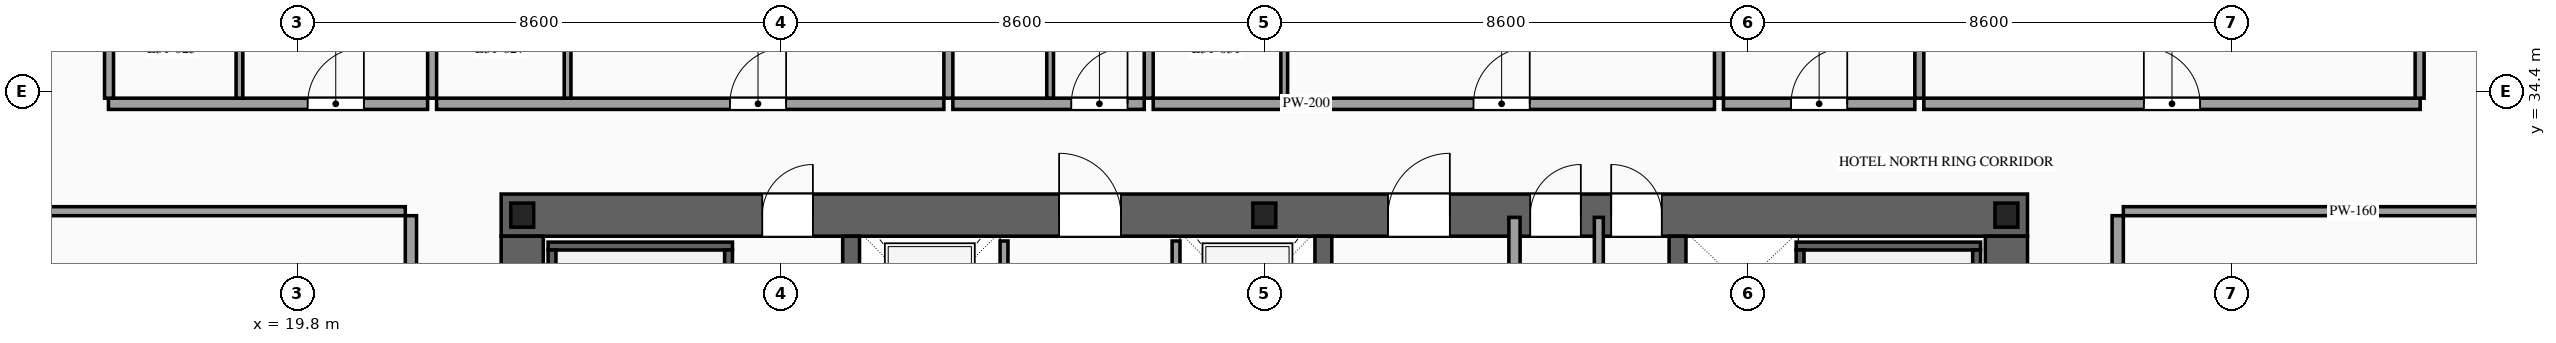
"""IFC4 building model, lengths in metres.
Left out: names, types, materials, properties, quantities, classifications, styles, units other than length and angle.
Written with IfcOpenShell. Run it as: python <this file> out.ifc"""

import sys

from ifc_helpers import new_model, si_unit, direction, frame, frame_2d, origin, origin_2d, place, context, subcontext, project, spatial, rectangle, i_section, extrude, source, transform, mapped, element, fill, save


model = new_model("IFC4")
c1 = context("Model", 3, precision=1e-05, world=origin(), true_north=direction((0.0, 1.0)))
c2 = subcontext(c1, "Body", "Model", "MODEL_VIEW")
j1 = project(units=[si_unit("LENGTHUNIT", "METRE"), si_unit("PLANEANGLEUNIT", "RADIAN")], contexts=[c1])
p1 = place(None, origin())
s1 = spatial("IfcSite", under=j1, at=p1, CompositionType="ELEMENT")
p2 = place(p1, origin())
s2 = spatial("IfcBuilding", under=s1, at=p2, CompositionType="ELEMENT")
p3 = place(p2, frame((0.0, 0.0, 119.0)))
s3 = spatial("IfcBuildingStorey", under=s2, at=p3, CompositionType="ELEMENT", Elevation=119.0)
p4 = place(p3, frame((23.425, 32.2, 0.0), z_axis=(0.0, 0.0, 1.0), x_axis=(1.0, 0.0, 0.0)))
e1 = element("IfcWall", 1, at=p4, inside=s3, PredefinedType="SHEAR", context=c2, shape_type="SweptSolid", body=[
    extrude(rectangle(XDim=27.15, YDim=0.75, at=frame_2d((13.575, 0.0))), origin(), (0.0, 0.0, 1.0), 3.6),
])
p5 = place(p4, frame((4.645, 0.0, 0.0)))
e2 = element("IfcOpeningElement", 2, at=p5, cuts=e1, PredefinedType="OPENING", context=c2, shape_type="SweptSolid", body=[
    extrude(rectangle(XDim=0.9, YDim=2.15, at=frame_2d((0.45, 1.075))), frame((0.0, 0.39, 0.0), z_axis=(0.0, -1.0, 0.0), x_axis=(1.0, 0.0, 0.0)), (0.0, 0.0, 1.0), 0.78),
])
p6 = place(p4, frame((9.925, 0.0, 0.0)))
e3 = element("IfcOpeningElement", 3, at=p6, cuts=e1, PredefinedType="OPENING", context=c2, shape_type="SweptSolid", body=[
    extrude(rectangle(XDim=1.1, YDim=2.2, at=frame_2d((0.55, 1.1))), frame((0.0, 0.39, 0.0), z_axis=(0.0, -1.0, 0.0), x_axis=(1.0, 0.0, 0.0)), (0.0, 0.0, 1.0), 0.78),
])
p7 = place(p4, frame((15.775, 0.0, 0.0)))
e4 = element("IfcOpeningElement", 4, at=p7, cuts=e1, PredefinedType="OPENING", context=c2, shape_type="SweptSolid", body=[
    extrude(rectangle(XDim=1.1, YDim=2.2, at=frame_2d((0.55, 1.1))), frame((0.0, 0.39, 0.0), z_axis=(0.0, -1.0, 0.0), x_axis=(1.0, 0.0, 0.0)), (0.0, 0.0, 1.0), 0.78),
])
p8 = place(p4, frame((18.305, 0.0, 0.0)))
e5 = element("IfcOpeningElement", 5, at=p8, cuts=e1, PredefinedType="OPENING", context=c2, shape_type="SweptSolid", body=[
    extrude(rectangle(XDim=0.9, YDim=2.15, at=frame_2d((0.45, 1.075))), frame((0.0, 0.39, 0.0), z_axis=(0.0, -1.0, 0.0), x_axis=(1.0, 0.0, 0.0)), (0.0, 0.0, 1.0), 0.78),
])
p9 = place(p4, frame((19.745, 0.0, 0.0)))
e6 = element("IfcOpeningElement", 6, at=p9, cuts=e1, PredefinedType="OPENING", context=c2, shape_type="SweptSolid", body=[
    extrude(rectangle(XDim=0.9, YDim=2.15, at=frame_2d((0.45, 1.075))), frame((0.0, 0.39, 0.0), z_axis=(0.0, -1.0, 0.0), x_axis=(1.0, 0.0, 0.0)), (0.0, 0.0, 1.0), 0.78),
])
m1 = source(origin(), c2, "Body", "SweptSolid", [
    extrude(rectangle(XDim=12.05, YDim=0.75, at=frame_2d((6.025, 0.0))), origin(), (0.0, 0.0, 1.0), 3.6),
])
for number, where, z_axis, x_axis in (
    (7, (23.8, 19.775, 0.0), (0.0, 0.0, 1.0), (0.0, 1.0, 0.0)),
    (8, (50.2, 19.775, 0.0), (0.0, 0.0, 1.0), (0.0, 1.0, 0.0)),
):
    element("IfcWall", number, at=place(p3, frame(where, z_axis=z_axis, x_axis=x_axis)), inside=s3, PredefinedType="SHEAR", context=c2, shape_type="MappedRepresentation", body=[
        mapped(m1, transform((0.0, 0.0, 0.0), scale=1.0)),
    ])
m2 = source(origin(), c2, "Body", "SweptSolid", [
    extrude(rectangle(XDim=12.05, YDim=0.3, at=frame_2d((6.025, 0.0))), origin(), (0.0, 0.0, 1.0), 3.6),
])
for number, where, z_axis, x_axis in (
    (9, (29.65, 19.775, 0.0), (0.0, 0.0, 1.0), (0.0, 1.0, 0.0)),
    (10, (38.05, 19.775, 0.0), (0.0, 0.0, 1.0), (0.0, 1.0, 0.0)),
    (11, (44.35, 19.775, 0.0), (0.0, 0.0, 1.0), (0.0, 1.0, 0.0)),
):
    element("IfcWall", number, at=place(p3, frame(where, z_axis=z_axis, x_axis=x_axis)), inside=s3, PredefinedType="SOLIDWALL", context=c2, shape_type="MappedRepresentation", body=[
        mapped(m2, transform((0.0, 0.0, 0.0), scale=1.0)),
    ])
m3 = source(origin(), c2, "Body", "SweptSolid", [
    extrude(i_section(OverallWidth=0.407, OverallDepth=0.428, WebThickness=0.02, FlangeThickness=0.035, at=origin_2d()), origin(), (0.0, 0.0, 1.0), 3.6),
])
for number, where, z_axis, x_axis in (
    (12, (23.8, 32.2, 0.0), (0.0, 0.0, 1.0), (1.0, 0.0, 0.0)),
    (13, (37.0, 32.2, 0.0), (0.0, 0.0, 1.0), (1.0, 0.0, 0.0)),
    (14, (50.2, 32.2, 0.0), (0.0, 0.0, 1.0), (1.0, 0.0, 0.0)),
):
    element("IfcColumn", number, at=place(p3, frame(where, z_axis=z_axis, x_axis=x_axis)), inside=s3, PredefinedType="COLUMN", context=c2, shape_type="MappedRepresentation", body=[
        mapped(m3, transform((0.0, 0.0, 0.0), scale=1.0)),
    ])
p10 = place(p3, frame((32.37, 29.4, 0.0), z_axis=(0.0, 0.0, 1.0), x_axis=(0.0, 1.0, 0.0)))
e15 = element("IfcWall", 15, at=p10, inside=s3, PredefinedType="SOLIDWALL", context=c2, shape_type="SweptSolid", body=[
    extrude(rectangle(XDim=2.34, YDim=0.14, at=frame_2d((1.17, 0.0))), origin(), (0.0, 0.0, 1.0), 3.38),
])
p11 = place(p10, frame((0.62, 0.0, 0.0)))
e16 = element("IfcOpeningElement", 16, at=p11, cuts=e15, PredefinedType="OPENING", context=c2, shape_type="SweptSolid", body=[
    extrude(rectangle(XDim=1.1, YDim=2.2, at=frame_2d((0.55, 1.1))), frame((0.0, 0.085, 0.0), z_axis=(0.0, -1.0, 0.0), x_axis=(1.0, 0.0, 0.0)), (0.0, 0.0, 1.0), 0.17),
])
p12 = place(p3, frame((35.43, 29.4, 0.0), z_axis=(0.0, 0.0, 1.0), x_axis=(0.0, 1.0, 0.0)))
e17 = element("IfcWall", 17, at=p12, inside=s3, PredefinedType="SOLIDWALL", context=c2, shape_type="SweptSolid", body=[
    extrude(rectangle(XDim=2.34, YDim=0.14, at=frame_2d((1.17, 0.0))), origin(), (0.0, 0.0, 1.0), 3.38),
])
p13 = place(p12, frame((0.62, 0.0, 0.0)))
e18 = element("IfcOpeningElement", 18, at=p13, cuts=e17, PredefinedType="OPENING", context=c2, shape_type="SweptSolid", body=[
    extrude(rectangle(XDim=1.1, YDim=2.2, at=frame_2d((0.55, 1.1))), frame((0.0, 0.085, 0.0), z_axis=(0.0, -1.0, 0.0), x_axis=(1.0, 0.0, 0.0)), (0.0, 0.0, 1.0), 0.17),
])
m4 = source(origin(), c2, "Body", "SweptSolid", [
    extrude(rectangle(XDim=3.28, YDim=0.14, at=frame_2d((1.64, 0.0))), origin(), (0.0, 0.0, 1.0), 3.38),
])
p14 = place(p3, frame((24.26, 31.65, 0.0), z_axis=(0.0, 0.0, 1.0), x_axis=(1.0, 0.0, 0.0)))
e19 = element("IfcWall", 19, at=p14, inside=s3, PredefinedType="SOLIDWALL", context=c2, shape_type="MappedRepresentation", body=[
    mapped(m4, transform((0.0, 0.0, 0.0), scale=1.0)),
])
m5 = source(origin(), c2, "Body", "SweptSolid", [
    extrude(rectangle(XDim=8.94, YDim=0.14, at=frame_2d((4.47, 0.0))), origin(), (0.0, 0.0, 1.0), 3.38),
])
for number, where, z_axis, x_axis in (
    (20, (24.33, 22.64, 0.0), (0.0, 0.0, 1.0), (0.0, 1.0, 0.0)),
    (21, (27.47, 22.64, 0.0), (0.0, 0.0, 1.0), (0.0, 1.0, 0.0)),
):
    element("IfcWall", number, at=place(p3, frame(where, z_axis=z_axis, x_axis=x_axis)), inside=s3, PredefinedType="SOLIDWALL", context=c2, shape_type="MappedRepresentation", body=[
        mapped(m5, transform((0.0, 0.0, 0.0), scale=1.0)),
    ])
p15 = place(p3, frame((46.46, 31.65, 0.0), z_axis=(0.0, 0.0, 1.0), x_axis=(1.0, 0.0, 0.0)))
e22 = element("IfcWall", 22, at=p15, inside=s3, PredefinedType="SOLIDWALL", context=c2, shape_type="MappedRepresentation", body=[
    mapped(m4, transform((0.0, 0.0, 0.0), scale=1.0)),
])
for number, where, z_axis, x_axis in (
    (23, (46.53, 22.64, 0.0), (0.0, 0.0, 1.0), (0.0, 1.0, 0.0)),
    (24, (49.67, 22.64, 0.0), (0.0, 0.0, 1.0), (0.0, 1.0, 0.0)),
):
    element("IfcWall", number, at=place(p3, frame(where, z_axis=z_axis, x_axis=x_axis)), inside=s3, PredefinedType="SOLIDWALL", context=c2, shape_type="MappedRepresentation", body=[
        mapped(m5, transform((0.0, 0.0, 0.0), scale=1.0)),
    ])
m6 = source(origin(), c2, "Body", "SweptSolid", [
    extrude(rectangle(XDim=5.96, YDim=0.2, at=frame_2d((2.98, 0.0))), origin(), (0.0, 0.0, 1.0), 3.38),
])
p16 = place(p3, frame((41.45, 26.2, 0.0), z_axis=(0.0, 0.0, 1.0), x_axis=(0.0, 1.0, 0.0)))
e25 = element("IfcWall", 25, at=p16, inside=s3, PredefinedType="PARTITIONING", context=c2, shape_type="MappedRepresentation", body=[
    mapped(m6, transform((0.0, 0.0, 0.0), scale=1.0)),
])
m7 = source(origin(), c2, "Body", "SweptSolid", [
    extrude(rectangle(XDim=5.96, YDim=0.16, at=frame_2d((2.98, 0.0))), origin(), (0.0, 0.0, 1.0), 3.38),
])
p17 = place(p3, frame((42.95, 26.2, 0.0), z_axis=(0.0, 0.0, 1.0), x_axis=(0.0, 1.0, 0.0)))
e26 = element("IfcWall", 26, at=p17, inside=s3, PredefinedType="PARTITIONING", context=c2, shape_type="MappedRepresentation", body=[
    mapped(m7, transform((0.0, 0.0, 0.0), scale=1.0)),
])
p18 = place(p3, frame((16.44, 34.18, 0.0), z_axis=(0.0, 0.0, 1.0), x_axis=(1.0, 0.0, 0.0)))
e27 = element("IfcWall", 27, at=p18, inside=s3, PredefinedType="PARTITIONING", context=c2, shape_type="SweptSolid", body=[
    extrude(rectangle(XDim=5.677, YDim=0.2, at=frame_2d((2.838, 0.0))), origin(), (0.0, 0.0, 1.0), 3.38),
])
p19 = place(p18, frame((3.543, 0.0, 0.0)))
e28 = element("IfcOpeningElement", 28, at=p19, cuts=e27, PredefinedType="OPENING", context=c2, shape_type="SweptSolid", body=[
    extrude(rectangle(XDim=1.0, YDim=2.2, at=frame_2d((0.5, 1.1))), frame((0.0, 0.115, 0.0), z_axis=(0.0, -1.0, 0.0), x_axis=(1.0, 0.0, 0.0)), (0.0, 0.0, 1.0), 0.23),
])
m8 = source(origin(), c2, "Body", "SweptSolid", [
    extrude(rectangle(XDim=14.97, YDim=0.16, at=frame_2d((7.485, 0.0))), origin(), (0.0, 0.0, 1.0), 3.38),
])
p20 = place(p3, frame((22.197, 34.28, 0.0), z_axis=(0.0, 0.0, 1.0), x_axis=(0.0, 1.0, 0.0)))
e29 = element("IfcWall", 29, at=p20, inside=s3, PredefinedType="PARTITIONING", context=c2, shape_type="MappedRepresentation", body=[
    mapped(m8, transform((0.0, 0.0, 0.0), scale=1.0)),
])
m9 = source(origin(), c2, "Body", "SweptSolid", [
    extrude(rectangle(XDim=2.42, YDim=0.12, at=frame_2d((1.21, 0.0))), origin(), (0.0, 0.0, 1.0), 3.38),
])
p21 = place(p3, frame((18.77, 34.28, 0.0), z_axis=(0.0, 0.0, 1.0), x_axis=(0.0, 1.0, 0.0)))
e30 = element("IfcWall", 30, at=p21, inside=s3, PredefinedType="PARTITIONING", context=c2, shape_type="MappedRepresentation", body=[
    mapped(m9, transform((0.0, 0.0, 0.0), scale=1.0)),
])
p22 = place(p3, frame((22.277, 34.18, 0.0), z_axis=(0.0, 0.0, 1.0), x_axis=(1.0, 0.0, 0.0)))
e31 = element("IfcWall", 31, at=p22, inside=s3, PredefinedType="PARTITIONING", context=c2, shape_type="SweptSolid", body=[
    extrude(rectangle(XDim=9.023, YDim=0.2, at=frame_2d((4.511, 0.0))), origin(), (0.0, 0.0, 1.0), 3.38),
])
p23 = place(p22, frame((5.217, 0.0, 0.0)))
e32 = element("IfcOpeningElement", 32, at=p23, cuts=e31, PredefinedType="OPENING", context=c2, shape_type="SweptSolid", body=[
    extrude(rectangle(XDim=1.0, YDim=2.2, at=frame_2d((0.5, 1.1))), frame((0.0, 0.115, 0.0), z_axis=(0.0, -1.0, 0.0), x_axis=(1.0, 0.0, 0.0)), (0.0, 0.0, 1.0), 0.23),
])
p24 = place(p3, frame((31.38, 34.28, 0.0), z_axis=(0.0, 0.0, 1.0), x_axis=(0.0, 1.0, 0.0)))
e33 = element("IfcWall", 33, at=p24, inside=s3, PredefinedType="PARTITIONING", context=c2, shape_type="MappedRepresentation", body=[
    mapped(m8, transform((0.0, 0.0, 0.0), scale=1.0)),
])
p25 = place(p3, frame((24.607, 34.28, 0.0), z_axis=(0.0, 0.0, 1.0), x_axis=(0.0, 1.0, 0.0)))
e34 = element("IfcWall", 34, at=p25, inside=s3, PredefinedType="PARTITIONING", context=c2, shape_type="MappedRepresentation", body=[
    mapped(m9, transform((0.0, 0.0, 0.0), scale=1.0)),
])
p26 = place(p3, frame((31.46, 34.18, 0.0), z_axis=(0.0, 0.0, 1.0), x_axis=(1.0, 0.0, 0.0)))
e35 = element("IfcWall", 35, at=p26, inside=s3, PredefinedType="PARTITIONING", context=c2, shape_type="SweptSolid", body=[
    extrude(rectangle(XDim=3.404, YDim=0.2, at=frame_2d((1.702, 0.0))), origin(), (0.0, 0.0, 1.0), 3.38),
])
p27 = place(p26, frame((2.107, 0.0, 0.0)))
e36 = element("IfcOpeningElement", 36, at=p27, cuts=e35, PredefinedType="OPENING", context=c2, shape_type="SweptSolid", body=[
    extrude(rectangle(XDim=1.0, YDim=2.2, at=frame_2d((0.5, 1.1))), frame((0.0, 0.115, 0.0), z_axis=(0.0, -1.0, 0.0), x_axis=(1.0, 0.0, 0.0)), (0.0, 0.0, 1.0), 0.23),
])
p28 = place(p3, frame((34.944, 34.28, 0.0), z_axis=(0.0, 0.0, 1.0), x_axis=(0.0, 1.0, 0.0)))
e37 = element("IfcWall", 37, at=p28, inside=s3, PredefinedType="PARTITIONING", context=c2, shape_type="MappedRepresentation", body=[
    mapped(m8, transform((0.0, 0.0, 0.0), scale=1.0)),
])
p29 = place(p3, frame((33.19, 34.28, 0.0), z_axis=(0.0, 0.0, 1.0), x_axis=(0.0, 1.0, 0.0)))
e38 = element("IfcWall", 38, at=p29, inside=s3, PredefinedType="PARTITIONING", context=c2, shape_type="MappedRepresentation", body=[
    mapped(m9, transform((0.0, 0.0, 0.0), scale=1.0)),
])
p30 = place(p3, frame((35.024, 34.18, 0.0), z_axis=(0.0, 0.0, 1.0), x_axis=(1.0, 0.0, 0.0)))
e39 = element("IfcWall", 39, at=p30, inside=s3, PredefinedType="PARTITIONING", context=c2, shape_type="SweptSolid", body=[
    extrude(rectangle(XDim=9.983, YDim=0.2, at=frame_2d((4.992, 0.0))), origin(), (0.0, 0.0, 1.0), 3.38),
])
p31 = place(p30, frame((5.697, 0.0, 0.0)))
e40 = element("IfcOpeningElement", 40, at=p31, cuts=e39, PredefinedType="OPENING", context=c2, shape_type="SweptSolid", body=[
    extrude(rectangle(XDim=1.0, YDim=2.2, at=frame_2d((0.5, 1.1))), frame((0.0, 0.115, 0.0), z_axis=(0.0, -1.0, 0.0), x_axis=(1.0, 0.0, 0.0)), (0.0, 0.0, 1.0), 0.23),
])
p32 = place(p3, frame((45.087, 34.28, 0.0), z_axis=(0.0, 0.0, 1.0), x_axis=(0.0, 1.0, 0.0)))
e41 = element("IfcWall", 41, at=p32, inside=s3, PredefinedType="PARTITIONING", context=c2, shape_type="MappedRepresentation", body=[
    mapped(m8, transform((0.0, 0.0, 0.0), scale=1.0)),
])
p33 = place(p3, frame((37.354, 34.28, 0.0), z_axis=(0.0, 0.0, 1.0), x_axis=(0.0, 1.0, 0.0)))
e42 = element("IfcWall", 42, at=p33, inside=s3, PredefinedType="PARTITIONING", context=c2, shape_type="MappedRepresentation", body=[
    mapped(m9, transform((0.0, 0.0, 0.0), scale=1.0)),
])
p34 = place(p3, frame((45.167, 34.18, 0.0), z_axis=(0.0, 0.0, 1.0), x_axis=(1.0, 0.0, 0.0)))
e43 = element("IfcWall", 43, at=p34, inside=s3, PredefinedType="PARTITIONING", context=c2, shape_type="SweptSolid", body=[
    extrude(rectangle(XDim=3.404, YDim=0.2, at=frame_2d((1.702, 0.0))), origin(), (0.0, 0.0, 1.0), 3.38),
])
p35 = place(p34, frame((1.202, 0.0, 0.0)))
e44 = element("IfcOpeningElement", 44, at=p35, cuts=e43, PredefinedType="OPENING", context=c2, shape_type="SweptSolid", body=[
    extrude(rectangle(XDim=1.0, YDim=2.2, at=frame_2d((0.5, 1.1))), frame((0.0, 0.115, 0.0), z_axis=(0.0, -1.0, 0.0), x_axis=(1.0, 0.0, 0.0)), (0.0, 0.0, 1.0), 0.23),
])
p36 = place(p3, frame((48.651, 34.28, 0.0), z_axis=(0.0, 0.0, 1.0), x_axis=(0.0, 1.0, 0.0)))
e45 = element("IfcWall", 45, at=p36, inside=s3, PredefinedType="PARTITIONING", context=c2, shape_type="MappedRepresentation", body=[
    mapped(m8, transform((0.0, 0.0, 0.0), scale=1.0)),
])
p37 = place(p3, frame((48.731, 34.18, 0.0), z_axis=(0.0, 0.0, 1.0), x_axis=(1.0, 0.0, 0.0)))
e46 = element("IfcWall", 46, at=p37, inside=s3, PredefinedType="PARTITIONING", context=c2, shape_type="SweptSolid", body=[
    extrude(rectangle(XDim=8.829, YDim=0.2, at=frame_2d((4.415, 0.0))), origin(), (0.0, 0.0, 1.0), 3.38),
])
p38 = place(p37, frame((3.914, 0.0, 0.0)))
e47 = element("IfcOpeningElement", 47, at=p38, cuts=e46, PredefinedType="OPENING", context=c2, shape_type="SweptSolid", body=[
    extrude(rectangle(XDim=1.0, YDim=2.2, at=frame_2d((0.5, 1.1))), frame((0.0, 0.115, 0.0), z_axis=(0.0, -1.0, 0.0), x_axis=(1.0, 0.0, 0.0)), (0.0, 0.0, 1.0), 0.23),
])
m10 = source(origin(), c2, "Body", "SweptSolid", [
    extrude(rectangle(XDim=14.82, YDim=0.16, at=frame_2d((7.41, 0.0))), origin(), (0.0, 0.0, 1.0), 3.38),
])
for number, where, z_axis, x_axis in (
    (48, (16.45, 34.28, 0.0), (0.0, 0.0, 1.0), (0.0, 1.0, 0.0)),
    (49, (57.55, 34.28, 0.0), (0.0, 0.0, 1.0), (0.0, 1.0, 0.0)),
):
    element("IfcWall", number, at=place(p3, frame(where, z_axis=z_axis, x_axis=x_axis)), inside=s3, PredefinedType="PARTITIONING", context=c2, shape_type="MappedRepresentation", body=[
        mapped(m10, transform((0.0, 0.0, 0.0), scale=1.0)),
    ])
p39 = place(p3, frame((21.82, 19.41, 0.0), z_axis=(0.0, 0.0, 1.0), x_axis=(0.0, 1.0, 0.0)))
e50 = element("IfcWall", 50, at=p39, inside=s3, PredefinedType="PARTITIONING", context=c2, shape_type="SweptSolid", body=[
    extrude(rectangle(XDim=12.78, YDim=0.2, at=frame_2d((6.39, 0.0))), origin(), (0.0, 0.0, 1.0), 3.38),
])
p40 = place(p39, frame((5.89, 0.0, 0.0)))
e51 = element("IfcOpeningElement", 51, at=p40, cuts=e50, PredefinedType="OPENING", context=c2, shape_type="SweptSolid", body=[
    extrude(rectangle(XDim=1.0, YDim=2.2, at=frame_2d((0.5, 1.1))), frame((0.0, 0.115, 0.0), z_axis=(0.0, -1.0, 0.0), x_axis=(1.0, 0.0, 0.0)), (0.0, 0.0, 1.0), 0.23),
])
m11 = source(origin(), c2, "Body", "SweptSolid", [
    extrude(rectangle(XDim=8.17, YDim=0.16, at=frame_2d((4.085, 0.0))), origin(), (0.0, 0.0, 1.0), 2.875),
])
p41 = place(p3, frame((13.55, 32.27, 0.0), z_axis=(0.0, 0.0, 1.0), x_axis=(1.0, 0.0, 0.0)))
e52 = element("IfcWall", 52, at=p41, inside=s3, PredefinedType="PARTITIONING", context=c2, shape_type="MappedRepresentation", body=[
    mapped(m11, transform((0.0, 0.0, 0.0), scale=1.0)),
])
p42 = place(p3, frame((52.18, 25.88, 0.0), z_axis=(0.0, 0.0, 1.0), x_axis=(0.0, 1.0, 0.0)))
e53 = element("IfcWall", 53, at=p42, inside=s3, PredefinedType="PARTITIONING", context=c2, shape_type="SweptSolid", body=[
    extrude(rectangle(XDim=6.31, YDim=0.2, at=frame_2d((3.155, 0.0))), origin(), (0.0, 0.0, 1.0), 3.38),
])
p43 = place(p42, frame((3.835, 0.0, 0.0)))
e54 = element("IfcOpeningElement", 54, at=p43, cuts=e53, PredefinedType="OPENING", context=c2, shape_type="SweptSolid", body=[
    extrude(rectangle(XDim=1.0, YDim=2.2, at=frame_2d((0.5, 1.1))), frame((0.0, 0.115, 0.0), z_axis=(0.0, -1.0, 0.0), x_axis=(1.0, 0.0, 0.0)), (0.0, 0.0, 1.0), 0.23),
])
p44 = place(p3, frame((52.28, 32.27, 0.0), z_axis=(0.0, 0.0, 1.0), x_axis=(1.0, 0.0, 0.0)))
e55 = element("IfcWall", 55, at=p44, inside=s3, PredefinedType="PARTITIONING", context=c2, shape_type="MappedRepresentation", body=[
    mapped(m11, transform((0.0, 0.0, 0.0), scale=1.0)),
])
m12 = source(origin(), c2, "Body", "SweptSolid", [
    extrude(rectangle(XDim=0.9, YDim=2.15, at=frame_2d((0.45, 1.075))), frame((0.0, 0.025, 0.0), z_axis=(0.0, -1.0, 0.0), x_axis=(1.0, 0.0, 0.0)), (0.0, 0.0, 1.0), 0.05),
])
p45 = place(p5, origin())
e56 = element("IfcDoor", 56, at=p45, inside=s3, OperationType="SINGLE_SWING_RIGHT", PredefinedType="DOOR", context=c2, shape_type="MappedRepresentation", body=[
    mapped(m12, transform((0.0, 0.0, 0.0), scale=1.0)),
])
fill(e2, e56)
m13 = source(origin(), c2, "Body", "SweptSolid", [
    extrude(rectangle(XDim=1.1, YDim=2.2, at=frame_2d((0.55, 1.1))), frame((0.0, 0.025, 0.0), z_axis=(0.0, -1.0, 0.0), x_axis=(1.0, 0.0, 0.0)), (0.0, 0.0, 1.0), 0.05),
])
p46 = place(p6, origin())
e57 = element("IfcDoor", 57, at=p46, inside=s3, OperationType="SINGLE_SWING_LEFT", PredefinedType="DOOR", context=c2, shape_type="MappedRepresentation", body=[
    mapped(m13, transform((0.0, 0.0, 0.0), scale=1.0)),
])
fill(e3, e57)
p47 = place(p7, origin())
e58 = element("IfcDoor", 58, at=p47, inside=s3, OperationType="SINGLE_SWING_RIGHT", PredefinedType="DOOR", context=c2, shape_type="MappedRepresentation", body=[
    mapped(m13, transform((0.0, 0.0, 0.0), scale=1.0)),
])
fill(e4, e58)
p48 = place(p8, origin())
e59 = element("IfcDoor", 59, at=p48, inside=s3, OperationType="SINGLE_SWING_RIGHT", PredefinedType="DOOR", context=c2, shape_type="MappedRepresentation", body=[
    mapped(m12, transform((0.0, 0.0, 0.0), scale=1.0)),
])
fill(e5, e59)
p49 = place(p9, origin())
e60 = element("IfcDoor", 60, at=p49, inside=s3, OperationType="SINGLE_SWING_LEFT", PredefinedType="DOOR", context=c2, shape_type="MappedRepresentation", body=[
    mapped(m12, transform((0.0, 0.0, 0.0), scale=1.0)),
])
fill(e6, e60)
m14 = source(origin(), c2, "Body", "SweptSolid", [
    extrude(rectangle(XDim=1.0, YDim=2.2, at=frame_2d((0.5, 1.1))), frame((0.0, 0.025, 0.0), z_axis=(0.0, -1.0, 0.0), x_axis=(1.0, 0.0, 0.0)), (0.0, 0.0, 1.0), 0.05),
])
p50 = place(p19, origin())
e61 = element("IfcDoor", 61, at=p50, inside=s3, OperationType="SINGLE_SWING_RIGHT", PredefinedType="DOOR", context=c2, shape_type="MappedRepresentation", body=[
    mapped(m14, transform((0.0, 0.0, 0.0), scale=1.0)),
])
fill(e28, e61)
p51 = place(p23, origin())
e62 = element("IfcDoor", 62, at=p51, inside=s3, OperationType="SINGLE_SWING_RIGHT", PredefinedType="DOOR", context=c2, shape_type="MappedRepresentation", body=[
    mapped(m14, transform((0.0, 0.0, 0.0), scale=1.0)),
])
fill(e32, e62)
p52 = place(p27, origin())
e63 = element("IfcDoor", 63, at=p52, inside=s3, OperationType="SINGLE_SWING_RIGHT", PredefinedType="DOOR", context=c2, shape_type="MappedRepresentation", body=[
    mapped(m14, transform((0.0, 0.0, 0.0), scale=1.0)),
])
fill(e36, e63)
p53 = place(p31, origin())
e64 = element("IfcDoor", 64, at=p53, inside=s3, OperationType="SINGLE_SWING_RIGHT", PredefinedType="DOOR", context=c2, shape_type="MappedRepresentation", body=[
    mapped(m14, transform((0.0, 0.0, 0.0), scale=1.0)),
])
fill(e40, e64)
p54 = place(p35, origin())
e65 = element("IfcDoor", 65, at=p54, inside=s3, OperationType="SINGLE_SWING_RIGHT", PredefinedType="DOOR", context=c2, shape_type="MappedRepresentation", body=[
    mapped(m14, transform((0.0, 0.0, 0.0), scale=1.0)),
])
fill(e44, e65)
p55 = place(p38, origin())
e66 = element("IfcDoor", 66, at=p55, inside=s3, OperationType="SINGLE_SWING_LEFT", PredefinedType="DOOR", context=c2, shape_type="MappedRepresentation", body=[
    mapped(m14, transform((0.0, 0.0, 0.0), scale=1.0)),
])
fill(e47, e66)
save(model, sys.argv[1])
